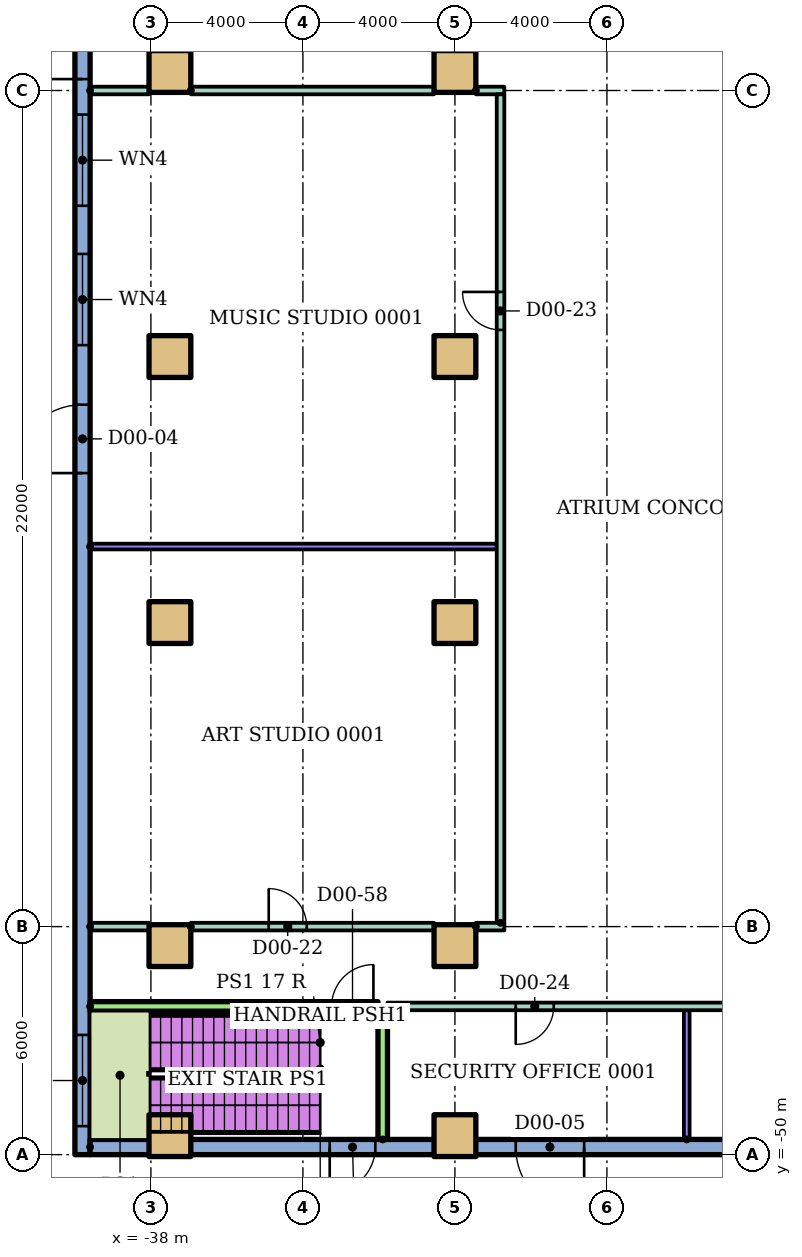
"""IFC4 building model, lengths in metres.
Left out: names, types, materials, properties, quantities, classifications, styles, units other than length and angle.
Written with IfcOpenShell. Run it as: python <this file> out.ifc"""

import sys

from ifc_helpers import new_model, si_unit, direction, frame, frame_2d, origin, origin_2d, place, context, subcontext, project, spatial, rectangle, extrude, element, fill, save


model = new_model("IFC4")
c1 = context("Model", 3, precision=1e-05, world=origin(), true_north=direction((0.0, 1.0)))
c2 = subcontext(c1, "Body", "Model", "MODEL_VIEW")
j1 = project(units=[si_unit("LENGTHUNIT", "METRE"), si_unit("PLANEANGLEUNIT", "RADIAN")], contexts=[c1])
p1 = place(None, origin())
s1 = spatial("IfcSite", under=j1, at=p1, CompositionType="ELEMENT")
p2 = place(p1, origin())
s2 = spatial("IfcBuilding", under=s1, at=p2, CompositionType="ELEMENT")
p3 = place(p2, origin())
s3 = spatial("IfcBuildingStorey", under=s2, at=p3, CompositionType="ELEMENT", Elevation=0.0)
for number, where in (
    (1, (-37.5, -49.5, 0.0)),
    (2, (-30.0, -49.5, 0.0)),
    (3, (-37.5, -44.5, 0.0)),
    (4, (-30.0, -44.5, 0.0)),
    (5, (-37.5, -36.0, 0.0)),
    (6, (-30.0, -36.0, 0.0)),
    (7, (-37.5, -29.0, 0.0)),
    (8, (-30.0, -29.0, 0.0)),
    (9, (-37.5, -21.5, 0.0)),
    (10, (-30.0, -21.5, 0.0)),
):
    element("IfcColumn", number, at=place(p3, frame(where)), inside=s3, PredefinedType="COLUMN", context=c2, shape_type="SweptSolid", body=[
        extrude(rectangle(XDim=1.1, YDim=1.1, at=origin_2d()), origin(), (0.0, 0.0, 1.0), 6.0),
    ])
p4 = place(p3, frame((-39.8, 20.0, 0.0), z_axis=(0.0, 0.0, 1.0), x_axis=(0.0, -1.0, 0.0)))
e11 = element("IfcWall", 11, at=p4, inside=s3, PredefinedType="STANDARD", context=c2, shape_type="SweptSolid", body=[
    extrude(rectangle(XDim=70.0, YDim=0.4, at=frame_2d((35.0, 0.0))), origin(), (0.0, 0.0, 1.0), 5.7),
])
p5 = place(p4, frame((50.267, 0.0, 0.0)))
e12 = element("IfcOpeningElement", 12, at=p5, cuts=e11, PredefinedType="OPENING", context=c2, shape_type="SweptSolid", body=[
    extrude(rectangle(XDim=1.8, YDim=2.4, at=frame_2d((0.9, 1.2))), frame((0.0, 0.21, 0.0), z_axis=(0.0, -1.0, 0.0), x_axis=(1.0, 0.0, 0.0)), (0.0, 0.0, 1.0), 0.42),
])
p6 = place(p4, frame((1.05, 0.0, 0.9)))
e13 = element("IfcOpeningElement", 13, at=p6, cuts=e11, PredefinedType="OPENING", context=c2, shape_type="SweptSolid", body=[
    extrude(rectangle(XDim=2.4, YDim=2.4, at=frame_2d((1.2, 1.2))), frame((0.0, 0.21, 0.0), z_axis=(0.0, -1.0, 0.0), x_axis=(1.0, 0.0, 0.0)), (0.0, 0.0, 1.0), 0.42),
])
p7 = place(p4, frame((5.55, 0.0, 0.9)))
e14 = element("IfcOpeningElement", 14, at=p7, cuts=e11, PredefinedType="OPENING", context=c2, shape_type="SweptSolid", body=[
    extrude(rectangle(XDim=2.4, YDim=2.4, at=frame_2d((1.2, 1.2))), frame((0.0, 0.21, 0.0), z_axis=(0.0, -1.0, 0.0), x_axis=(1.0, 0.0, 0.0)), (0.0, 0.0, 1.0), 0.42),
])
p8 = place(p4, frame((9.863, 0.0, 0.9)))
e15 = element("IfcOpeningElement", 15, at=p8, cuts=e11, PredefinedType="OPENING", context=c2, shape_type="SweptSolid", body=[
    extrude(rectangle(XDim=2.4, YDim=2.4, at=frame_2d((1.2, 1.2))), frame((0.0, 0.21, 0.0), z_axis=(0.0, -1.0, 0.0), x_axis=(1.0, 0.0, 0.0)), (0.0, 0.0, 1.0), 0.42),
])
p9 = place(p4, frame((13.988, 0.0, 0.9)))
e16 = element("IfcOpeningElement", 16, at=p9, cuts=e11, PredefinedType="OPENING", context=c2, shape_type="SweptSolid", body=[
    extrude(rectangle(XDim=2.4, YDim=2.4, at=frame_2d((1.2, 1.2))), frame((0.0, 0.21, 0.0), z_axis=(0.0, -1.0, 0.0), x_axis=(1.0, 0.0, 0.0)), (0.0, 0.0, 1.0), 0.42),
])
p10 = place(p4, frame((18.113, 0.0, 0.9)))
e17 = element("IfcOpeningElement", 17, at=p10, cuts=e11, PredefinedType="OPENING", context=c2, shape_type="SweptSolid", body=[
    extrude(rectangle(XDim=2.4, YDim=2.4, at=frame_2d((1.2, 1.2))), frame((0.0, 0.21, 0.0), z_axis=(0.0, -1.0, 0.0), x_axis=(1.0, 0.0, 0.0)), (0.0, 0.0, 1.0), 0.42),
])
p11 = place(p4, frame((22.238, 0.0, 0.9)))
e18 = element("IfcOpeningElement", 18, at=p11, cuts=e11, PredefinedType="OPENING", context=c2, shape_type="SweptSolid", body=[
    extrude(rectangle(XDim=2.4, YDim=2.4, at=frame_2d((1.2, 1.2))), frame((0.0, 0.21, 0.0), z_axis=(0.0, -1.0, 0.0), x_axis=(1.0, 0.0, 0.0)), (0.0, 0.0, 1.0), 0.42),
])
p12 = place(p4, frame((34.613, 0.0, 0.9)))
e19 = element("IfcOpeningElement", 19, at=p12, cuts=e11, PredefinedType="OPENING", context=c2, shape_type="SweptSolid", body=[
    extrude(rectangle(XDim=2.4, YDim=2.4, at=frame_2d((1.2, 1.2))), frame((0.0, 0.21, 0.0), z_axis=(0.0, -1.0, 0.0), x_axis=(1.0, 0.0, 0.0)), (0.0, 0.0, 1.0), 0.42),
])
p13 = place(p4, frame((42.633, 0.0, 0.9)))
e20 = element("IfcOpeningElement", 20, at=p13, cuts=e11, PredefinedType="OPENING", context=c2, shape_type="SweptSolid", body=[
    extrude(rectangle(XDim=2.4, YDim=2.4, at=frame_2d((1.2, 1.2))), frame((0.0, 0.21, 0.0), z_axis=(0.0, -1.0, 0.0), x_axis=(1.0, 0.0, 0.0)), (0.0, 0.0, 1.0), 0.42),
])
p14 = place(p4, frame((46.3, 0.0, 0.9)))
e21 = element("IfcOpeningElement", 21, at=p14, cuts=e11, PredefinedType="OPENING", context=c2, shape_type="SweptSolid", body=[
    extrude(rectangle(XDim=2.4, YDim=2.4, at=frame_2d((1.2, 1.2))), frame((0.0, 0.21, 0.0), z_axis=(0.0, -1.0, 0.0), x_axis=(1.0, 0.0, 0.0)), (0.0, 0.0, 1.0), 0.42),
])
p15 = place(p4, frame((66.85, 0.0, 0.9)))
e22 = element("IfcOpeningElement", 22, at=p15, cuts=e11, PredefinedType="OPENING", context=c2, shape_type="SweptSolid", body=[
    extrude(rectangle(XDim=2.4, YDim=2.4, at=frame_2d((1.2, 1.2))), frame((0.0, 0.21, 0.0), z_axis=(0.0, -1.0, 0.0), x_axis=(1.0, 0.0, 0.0)), (0.0, 0.0, 1.0), 0.42),
])
p16 = place(p4, frame((28.7, 0.0, 0.0)))
e23 = element("IfcOpeningElement", 23, at=p16, cuts=e11, PredefinedType="OPENING", context=c2, shape_type="SweptSolid", body=[
    extrude(rectangle(XDim=1.8, YDim=2.1, at=frame_2d((0.9, 1.05))), frame((0.0, 0.21, 0.0), z_axis=(0.0, -1.0, 0.0), x_axis=(1.0, 0.0, 0.0)), (0.0, 0.0, 1.0), 0.42),
])
p17 = place(p4, frame((39.9, 0.0, 0.0)))
e24 = element("IfcOpeningElement", 24, at=p17, cuts=e11, PredefinedType="OPENING", context=c2, shape_type="SweptSolid", body=[
    extrude(rectangle(XDim=1.8, YDim=2.1, at=frame_2d((0.9, 1.05))), frame((0.0, 0.21, 0.0), z_axis=(0.0, -1.0, 0.0), x_axis=(1.0, 0.0, 0.0)), (0.0, 0.0, 1.0), 0.42),
])
p18 = place(p3, frame((-39.6, -49.8, 0.0)))
e25 = element("IfcWall", 25, at=p18, inside=s3, PredefinedType="STANDARD", context=c2, shape_type="SweptSolid", body=[
    extrude(rectangle(XDim=79.2, YDim=0.4, at=frame_2d((39.6, 0.0))), origin(), (0.0, 0.0, 1.0), 5.7),
])
p19 = place(p18, frame((11.2, 0.0, 0.0)))
e26 = element("IfcOpeningElement", 26, at=p19, cuts=e25, PredefinedType="OPENING", context=c2, shape_type="SweptSolid", body=[
    extrude(rectangle(XDim=1.8, YDim=2.4, at=frame_2d((0.9, 1.2))), frame((0.0, 0.21, 0.0), z_axis=(0.0, -1.0, 0.0), x_axis=(1.0, 0.0, 0.0)), (0.0, 0.0, 1.0), 0.42),
])
p20 = place(p18, frame((38.11, 0.0, 0.0)))
e27 = element("IfcOpeningElement", 27, at=p20, cuts=e25, PredefinedType="OPENING", context=c2, shape_type="SweptSolid", body=[
    extrude(rectangle(XDim=2.4, YDim=2.4, at=frame_2d((1.2, 1.2))), frame((0.0, 0.21, 0.0), z_axis=(0.0, -1.0, 0.0), x_axis=(1.0, 0.0, 0.0)), (0.0, 0.0, 1.0), 0.42),
])
p21 = place(p18, frame((54.41, 0.0, 0.0)))
e28 = element("IfcOpeningElement", 28, at=p21, cuts=e25, PredefinedType="OPENING", context=c2, shape_type="SweptSolid", body=[
    extrude(rectangle(XDim=1.8, YDim=2.4, at=frame_2d((0.9, 1.2))), frame((0.0, 0.21, 0.0), z_axis=(0.0, -1.0, 0.0), x_axis=(1.0, 0.0, 0.0)), (0.0, 0.0, 1.0), 0.42),
])
p22 = place(p18, frame((22.11, 0.0, 0.9)))
e29 = element("IfcOpeningElement", 29, at=p22, cuts=e25, PredefinedType="OPENING", context=c2, shape_type="SweptSolid", body=[
    extrude(rectangle(XDim=2.4, YDim=2.4, at=frame_2d((1.2, 1.2))), frame((0.0, 0.21, 0.0), z_axis=(0.0, -1.0, 0.0), x_axis=(1.0, 0.0, 0.0)), (0.0, 0.0, 1.0), 0.42),
])
p23 = place(p18, frame((30.11, 0.0, 0.9)))
e30 = element("IfcOpeningElement", 30, at=p23, cuts=e25, PredefinedType="OPENING", context=c2, shape_type="SweptSolid", body=[
    extrude(rectangle(XDim=2.075, YDim=2.4, at=frame_2d((1.038, 1.2))), frame((0.0, 0.21, 0.0), z_axis=(0.0, -1.0, 0.0), x_axis=(1.0, 0.0, 0.0)), (0.0, 0.0, 1.0), 0.42),
])
p24 = place(p18, frame((47.015, 0.0, 0.9)))
e31 = element("IfcOpeningElement", 31, at=p24, cuts=e25, PredefinedType="OPENING", context=c2, shape_type="SweptSolid", body=[
    extrude(rectangle(XDim=1.495, YDim=2.4, at=frame_2d((0.748, 1.2))), frame((0.0, 0.21, 0.0), z_axis=(0.0, -1.0, 0.0), x_axis=(1.0, 0.0, 0.0)), (0.0, 0.0, 1.0), 0.42),
])
p25 = place(p18, frame((6.305, 0.0, 0.0)))
e32 = element("IfcOpeningElement", 32, at=p25, cuts=e25, PredefinedType="OPENING", context=c2, shape_type="SweptSolid", body=[
    extrude(rectangle(XDim=1.2, YDim=2.1, at=frame_2d((0.6, 1.05))), frame((0.0, 0.21, 0.0), z_axis=(0.0, -1.0, 0.0), x_axis=(1.0, 0.0, 0.0)), (0.0, 0.0, 1.0), 0.42),
])
p26 = place(p18, frame((71.845, 0.0, 0.0)))
e33 = element("IfcOpeningElement", 33, at=p26, cuts=e25, PredefinedType="OPENING", context=c2, shape_type="SweptSolid", body=[
    extrude(rectangle(XDim=1.2, YDim=2.1, at=frame_2d((0.6, 1.05))), frame((0.0, 0.21, 0.0), z_axis=(0.0, -1.0, 0.0), x_axis=(1.0, 0.0, 0.0)), (0.0, 0.0, 1.0), 0.42),
])
p27 = place(p18, frame((27.945, 0.0, 0.0)))
e34 = element("IfcOpeningElement", 34, at=p27, cuts=e25, PredefinedType="OPENING", context=c2, shape_type="SweptSolid", body=[
    extrude(rectangle(XDim=1.2, YDim=2.1, at=frame_2d((0.6, 1.05))), frame((0.0, 0.21, 0.0), z_axis=(0.0, -1.0, 0.0), x_axis=(1.0, 0.0, 0.0)), (0.0, 0.0, 1.0), 0.42),
])
p28 = place(p18, frame((50.205, 0.0, 0.0)))
e35 = element("IfcOpeningElement", 35, at=p28, cuts=e25, PredefinedType="OPENING", context=c2, shape_type="SweptSolid", body=[
    extrude(rectangle(XDim=1.2, YDim=2.1, at=frame_2d((0.6, 1.05))), frame((0.0, 0.21, 0.0), z_axis=(0.0, -1.0, 0.0), x_axis=(1.0, 0.0, 0.0)), (0.0, 0.0, 1.0), 0.42),
])
p29 = place(p3, frame((-31.775, -46.1, 0.0)))
e36 = element("IfcWall", 36, at=p29, inside=s3, PredefinedType="PARTITIONING", context=c2, shape_type="SweptSolid", body=[
    extrude(rectangle(XDim=19.65, YDim=0.2, at=frame_2d((9.825, 0.0))), origin(), (0.0, 0.0, 1.0), 5.7),
])
p30 = place(p29, frame((3.375, 0.0, 0.0)))
e37 = element("IfcOpeningElement", 37, at=p30, cuts=e36, PredefinedType="OPENING", context=c2, shape_type="SweptSolid", body=[
    extrude(rectangle(XDim=1.0, YDim=2.1, at=frame_2d((0.5, 1.05))), frame((0.0, 0.11, 0.0), z_axis=(0.0, -1.0, 0.0), x_axis=(1.0, 0.0, 0.0)), (0.0, 0.0, 1.0), 0.22),
])
p31 = place(p29, frame((13.325, 0.0, 0.0)))
e38 = element("IfcOpeningElement", 38, at=p31, cuts=e36, PredefinedType="OPENING", context=c2, shape_type="SweptSolid", body=[
    extrude(rectangle(XDim=1.0, YDim=2.1, at=frame_2d((0.5, 1.05))), frame((0.0, 0.11, 0.0), z_axis=(0.0, -1.0, 0.0), x_axis=(1.0, 0.0, 0.0)), (0.0, 0.0, 1.0), 0.22),
])
p32 = place(p3, frame((-39.6, -46.1, 0.0)))
e39 = element("IfcWall", 39, at=p32, inside=s3, PredefinedType="SOLIDWALL", context=c2, shape_type="SweptSolid", body=[
    extrude(rectangle(XDim=7.575, YDim=0.25, at=frame_2d((3.788, 0.0))), origin(), (0.0, 0.0, 1.0), 5.7),
])
p33 = place(p32, frame((6.355, 0.0, 0.0)))
e40 = element("IfcOpeningElement", 40, at=p33, cuts=e39, PredefinedType="OPENING", context=c2, shape_type="SweptSolid", body=[
    extrude(rectangle(XDim=1.1, YDim=2.1, at=frame_2d((0.55, 1.05))), frame((0.0, 0.135, 0.0), z_axis=(0.0, -1.0, 0.0), x_axis=(1.0, 0.0, 0.0)), (0.0, 0.0, 1.0), 0.27),
])
p34 = place(p3, frame((-39.6, -44.0, 0.0)))
e41 = element("IfcWall", 41, at=p34, inside=s3, PredefinedType="PARTITIONING", context=c2, shape_type="SweptSolid", body=[
    extrude(rectangle(XDim=1.55, YDim=0.2, at=frame_2d((0.775, 0.0))), origin(), (0.0, 0.0, 1.0), 5.7),
])
p35 = place(p3, frame((-36.95, -44.0, 0.0)))
e42 = element("IfcWall", 42, at=p35, inside=s3, PredefinedType="PARTITIONING", context=c2, shape_type="SweptSolid", body=[
    extrude(rectangle(XDim=6.4, YDim=0.2, at=frame_2d((3.2, 0.0))), origin(), (0.0, 0.0, 1.0), 5.7),
])
p36 = place(p35, frame((2.05, 0.0, 0.0)))
e43 = element("IfcOpeningElement", 43, at=p36, cuts=e42, PredefinedType="OPENING", context=c2, shape_type="SweptSolid", body=[
    extrude(rectangle(XDim=1.0, YDim=2.1, at=frame_2d((0.5, 1.05))), frame((0.0, 0.11, 0.0), z_axis=(0.0, -1.0, 0.0), x_axis=(1.0, 0.0, 0.0)), (0.0, 0.0, 1.0), 0.22),
])
p37 = place(p3, frame((-29.45, -44.0, 0.0)))
e44 = element("IfcWall", 44, at=p37, inside=s3, PredefinedType="PARTITIONING", context=c2, shape_type="SweptSolid", body=[
    extrude(rectangle(XDim=0.75, YDim=0.2, at=frame_2d((0.375, 0.0))), origin(), (0.0, 0.0, 1.0), 5.7),
])
p38 = place(p3, frame((-39.6, -34.0, 0.0)))
e45 = element("IfcWall", 45, at=p38, inside=s3, PredefinedType="PARTITIONING", context=c2, shape_type="SweptSolid", body=[
    extrude(rectangle(XDim=10.7, YDim=0.15, at=frame_2d((5.35, 0.0))), origin(), (0.0, 0.0, 1.0), 5.7),
])
p39 = place(p3, frame((-39.6, -22.0, 0.0)))
e46 = element("IfcWall", 46, at=p39, inside=s3, PredefinedType="PARTITIONING", context=c2, shape_type="SweptSolid", body=[
    extrude(rectangle(XDim=1.55, YDim=0.2, at=frame_2d((0.775, 0.0))), origin(), (0.0, 0.0, 1.0), 5.7),
])
p40 = place(p3, frame((-36.95, -22.0, 0.0)))
e47 = element("IfcWall", 47, at=p40, inside=s3, PredefinedType="PARTITIONING", context=c2, shape_type="SweptSolid", body=[
    extrude(rectangle(XDim=6.4, YDim=0.2, at=frame_2d((3.2, 0.0))), origin(), (0.0, 0.0, 1.0), 5.7),
])
p41 = place(p3, frame((-29.45, -22.0, 0.0)))
e48 = element("IfcWall", 48, at=p41, inside=s3, PredefinedType="PARTITIONING", context=c2, shape_type="SweptSolid", body=[
    extrude(rectangle(XDim=0.75, YDim=0.2, at=frame_2d((0.375, 0.0))), origin(), (0.0, 0.0, 1.0), 5.7),
])
p42 = place(p3, frame((-31.9, -49.6, 0.0), z_axis=(0.0, 0.0, 1.0), x_axis=(0.0, 1.0, 0.0)))
e49 = element("IfcWall", 49, at=p42, inside=s3, PredefinedType="SOLIDWALL", context=c2, shape_type="SweptSolid", body=[
    extrude(rectangle(XDim=3.375, YDim=0.25, at=frame_2d((1.688, 0.0))), origin(), (0.0, 0.0, 1.0), 5.7),
])
p43 = place(p3, frame((-28.8, -43.9, 0.0), z_axis=(0.0, 0.0, 1.0), x_axis=(0.0, 1.0, 0.0)))
e50 = element("IfcWall", 50, at=p43, inside=s3, PredefinedType="PARTITIONING", context=c2, shape_type="SweptSolid", body=[
    extrude(rectangle(XDim=21.8, YDim=0.2, at=frame_2d((10.9, 0.0))), origin(), (0.0, 0.0, 1.0), 5.7),
])
p44 = place(p43, frame((15.6, 0.0, 0.0)))
e51 = element("IfcOpeningElement", 51, at=p44, cuts=e50, PredefinedType="OPENING", context=c2, shape_type="SweptSolid", body=[
    extrude(rectangle(XDim=1.0, YDim=2.1, at=frame_2d((0.5, 1.05))), frame((0.0, 0.11, 0.0), z_axis=(0.0, -1.0, 0.0), x_axis=(1.0, 0.0, 0.0)), (0.0, 0.0, 1.0), 0.22),
])
p45 = place(p3, frame((-23.9, -49.6, 0.0), z_axis=(0.0, 0.0, 1.0), x_axis=(0.0, 1.0, 0.0)))
e52 = element("IfcWall", 52, at=p45, inside=s3, PredefinedType="PARTITIONING", context=c2, shape_type="SweptSolid", body=[
    extrude(rectangle(XDim=3.4, YDim=0.15, at=frame_2d((1.7, 0.0))), origin(), (0.0, 0.0, 1.0), 5.7),
])
p46 = place(p5, frame((1.8, 0.0, 0.0), z_axis=(0.0, 0.0, 1.0), x_axis=(-1.0, 0.0, 0.0)))
e53 = element("IfcDoor", 53, at=p46, inside=s3, OperationType="DOUBLE_DOOR_SINGLE_SWING", PredefinedType="DOOR", context=c2, shape_type="SweptSolid", body=[
    extrude(rectangle(XDim=1.8, YDim=2.4, at=frame_2d((0.9, 1.2))), frame((0.0, 0.025, 0.0), z_axis=(0.0, -1.0, 0.0), x_axis=(1.0, 0.0, 0.0)), (0.0, 0.0, 1.0), 0.05),
])
fill(e12, e53)
p47 = place(p13, origin())
e54 = element("IfcWindow", 54, at=p47, inside=s3, PartitioningType="SINGLE_PANEL", PredefinedType="WINDOW", context=c2, shape_type="SweptSolid", body=[
    extrude(rectangle(XDim=2.4, YDim=2.4, at=frame_2d((1.2, 1.2))), frame((0.0, 0.03, 0.0), z_axis=(0.0, -1.0, 0.0), x_axis=(1.0, 0.0, 0.0)), (0.0, 0.0, 1.0), 0.06),
])
fill(e20, e54)
p48 = place(p14, origin())
e55 = element("IfcWindow", 55, at=p48, inside=s3, PartitioningType="SINGLE_PANEL", PredefinedType="WINDOW", context=c2, shape_type="SweptSolid", body=[
    extrude(rectangle(XDim=2.4, YDim=2.4, at=frame_2d((1.2, 1.2))), frame((0.0, 0.03, 0.0), z_axis=(0.0, -1.0, 0.0), x_axis=(1.0, 0.0, 0.0)), (0.0, 0.0, 1.0), 0.06),
])
fill(e21, e55)
p49 = place(p15, origin())
e56 = element("IfcWindow", 56, at=p49, inside=s3, PartitioningType="SINGLE_PANEL", PredefinedType="WINDOW", context=c2, shape_type="SweptSolid", body=[
    extrude(rectangle(XDim=2.4, YDim=2.4, at=frame_2d((1.2, 1.2))), frame((0.0, 0.03, 0.0), z_axis=(0.0, -1.0, 0.0), x_axis=(1.0, 0.0, 0.0)), (0.0, 0.0, 1.0), 0.06),
])
fill(e22, e56)
p50 = place(p19, frame((1.8, 0.0, 0.0), z_axis=(0.0, 0.0, 1.0), x_axis=(-1.0, 0.0, 0.0)))
e57 = element("IfcDoor", 57, at=p50, inside=s3, OperationType="DOUBLE_DOOR_SINGLE_SWING", PredefinedType="DOOR", context=c2, shape_type="SweptSolid", body=[
    extrude(rectangle(XDim=1.8, YDim=2.4, at=frame_2d((0.9, 1.2))), frame((0.0, 0.025, 0.0), z_axis=(0.0, -1.0, 0.0), x_axis=(1.0, 0.0, 0.0)), (0.0, 0.0, 1.0), 0.05),
])
fill(e26, e57)
p51 = place(p36, origin())
e58 = element("IfcDoor", 58, at=p51, inside=s3, OperationType="SINGLE_SWING_LEFT", PredefinedType="DOOR", context=c2, shape_type="SweptSolid", body=[
    extrude(rectangle(XDim=1.0, YDim=2.1, at=frame_2d((0.5, 1.05))), frame((0.0, 0.025, 0.0), z_axis=(0.0, -1.0, 0.0), x_axis=(1.0, 0.0, 0.0)), (0.0, 0.0, 1.0), 0.05),
])
fill(e43, e58)
p52 = place(p44, origin())
e59 = element("IfcDoor", 59, at=p52, inside=s3, OperationType="SINGLE_SWING_RIGHT", PredefinedType="DOOR", context=c2, shape_type="SweptSolid", body=[
    extrude(rectangle(XDim=1.0, YDim=2.1, at=frame_2d((0.5, 1.05))), frame((0.0, 0.025, 0.0), z_axis=(0.0, -1.0, 0.0), x_axis=(1.0, 0.0, 0.0)), (0.0, 0.0, 1.0), 0.05),
])
fill(e51, e59)
p53 = place(p30, frame((1.0, 0.0, 0.0), z_axis=(0.0, 0.0, 1.0), x_axis=(-1.0, 0.0, 0.0)))
e60 = element("IfcDoor", 60, at=p53, inside=s3, OperationType="SINGLE_SWING_LEFT", PredefinedType="DOOR", context=c2, shape_type="SweptSolid", body=[
    extrude(rectangle(XDim=1.0, YDim=2.1, at=frame_2d((0.5, 1.05))), frame((0.0, 0.025, 0.0), z_axis=(0.0, -1.0, 0.0), x_axis=(1.0, 0.0, 0.0)), (0.0, 0.0, 1.0), 0.05),
])
fill(e37, e60)
p54 = place(p33, origin())
e61 = element("IfcDoor", 61, at=p54, inside=s3, OperationType="SINGLE_SWING_RIGHT", PredefinedType="DOOR", context=c2, shape_type="SweptSolid", body=[
    extrude(rectangle(XDim=1.1, YDim=2.1, at=frame_2d((0.55, 1.05))), frame((0.0, 0.025, 0.0), z_axis=(0.0, -1.0, 0.0), x_axis=(1.0, 0.0, 0.0)), (0.0, 0.0, 1.0), 0.05),
])
fill(e40, e61)
p55 = place(p25, frame((1.2, 0.0, 0.0), z_axis=(0.0, 0.0, 1.0), x_axis=(-1.0, 0.0, 0.0)))
e62 = element("IfcDoor", 62, at=p55, inside=s3, OperationType="SINGLE_SWING_LEFT", PredefinedType="DOOR", context=c2, shape_type="SweptSolid", body=[
    extrude(rectangle(XDim=1.2, YDim=2.1, at=frame_2d((0.6, 1.05))), frame((0.0, 0.025, 0.0), z_axis=(0.0, -1.0, 0.0), x_axis=(1.0, 0.0, 0.0)), (0.0, 0.0, 1.0), 0.05),
])
fill(e32, e62)
p56 = place(p17, frame((1.8, 0.0, 0.0), z_axis=(0.0, 0.0, 1.0), x_axis=(-1.0, 0.0, 0.0)))
e63 = element("IfcDoor", 63, at=p56, inside=s3, OperationType="DOUBLE_DOOR_SINGLE_SWING", PredefinedType="DOOR", context=c2, shape_type="SweptSolid", body=[
    extrude(rectangle(XDim=1.8, YDim=2.1, at=frame_2d((0.9, 1.05))), frame((0.0, 0.025, 0.0), z_axis=(0.0, -1.0, 0.0), x_axis=(1.0, 0.0, 0.0)), (0.0, 0.0, 1.0), 0.05),
])
fill(e24, e63)
save(model, sys.argv[1])
